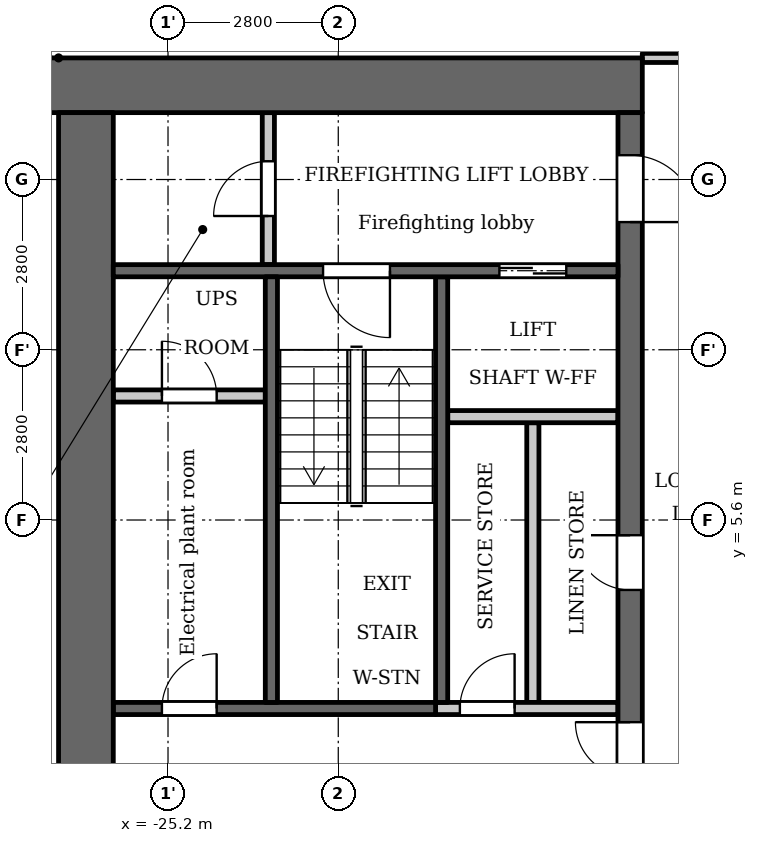
"""IFC4 building model, lengths in metres.
Left out: names, types, materials, properties, quantities, classifications, styles, units other than length and angle.
Written with IfcOpenShell. Run it as: python <this file> out.ifc"""

import sys

from ifc_helpers import new_model, si_unit, direction, frame, frame_2d, origin, place, context, subcontext, project, spatial, rectangle, extrude, element, fill, save


model = new_model("IFC4")
c1 = context("Model", 3, precision=1e-05, world=origin(), true_north=direction((0.0, 1.0)))
c2 = subcontext(c1, "Body", "Model", "MODEL_VIEW")
j1 = project(units=[si_unit("LENGTHUNIT", "METRE"), si_unit("PLANEANGLEUNIT", "RADIAN")], contexts=[c1])
p1 = place(None, origin())
s1 = spatial("IfcSite", under=j1, at=p1, CompositionType="ELEMENT")
p2 = place(p1, origin())
s2 = spatial("IfcBuilding", under=s1, at=p2, CompositionType="ELEMENT")
p3 = place(p2, frame((0.0, 0.0, 69.0)))
s3 = spatial("IfcBuildingStorey", under=s2, at=p3, CompositionType="ELEMENT", Elevation=69.0)
p4 = place(p3, frame((-20.7, 2.6, 0.0), z_axis=(0.0, 0.0, 1.0), x_axis=(0.0, 1.0, 0.0)))
e1 = element("IfcWall", 1, at=p4, inside=s3, PredefinedType="SHEAR", context=c2, shape_type="SweptSolid", body=[
    extrude(rectangle(XDim=7.0, YDim=0.2, at=frame_2d((3.5, 0.0))), origin(), (0.0, 0.0, 1.0), 3.15),
])
p5 = place(p3, frame((-20.8, 2.5, 0.0), z_axis=(0.0, 0.0, 1.0), x_axis=(-1.0, 0.0, 0.0)))
e2 = element("IfcWall", 2, at=p5, inside=s3, PredefinedType="SHEAR", context=c2, shape_type="SweptSolid", body=[
    extrude(rectangle(XDim=5.3, YDim=0.2, at=frame_2d((2.65, 0.0))), origin(), (0.0, 0.0, 1.0), 3.15),
])
p6 = place(p5, frame((3.6, 0.0, 0.0)))
e3 = element("IfcOpeningElement", 3, at=p6, cuts=e2, PredefinedType="OPENING", context=c2, shape_type="SweptSolid", body=[
    extrude(rectangle(XDim=0.9, YDim=2.1, at=frame_2d((0.45, 1.05))), frame((0.0, 0.11, 0.0), z_axis=(0.0, -1.0, 0.0), x_axis=(1.0, 0.0, 0.0)), (0.0, 0.0, 1.0), 0.22),
])
p7 = place(p3, frame((-17.4, 12.75, 0.0), z_axis=(0.0, 0.0, 1.0), x_axis=(-1.0, 0.0, 0.0)))
e4 = element("IfcWall", 4, at=p7, inside=s3, PredefinedType="SHEAR", context=c2, shape_type="SweptSolid", body=[
    extrude(rectangle(XDim=10.4, YDim=0.9, at=frame_2d((5.2, 0.0))), origin(), (0.0, 0.0, 1.0), 3.15),
])
p8 = place(p3, frame((-19.2, 2.6, 0.0), z_axis=(0.0, 0.0, 1.0), x_axis=(0.0, 1.0, 0.0)))
e5 = element("IfcWall", 5, at=p8, inside=s3, PredefinedType="PARTITIONING", context=c2, shape_type="SweptSolid", body=[
    extrude(rectangle(XDim=4.6, YDim=0.2, at=frame_2d((2.3, 0.0))), origin(), (0.0, 0.0, 1.0), 3.15),
])
p9 = place(p3, frame((-17.6, -12.3, 0.0), z_axis=(0.0, 0.0, 1.0), x_axis=(0.0, 1.0, 0.0)))
e6 = element("IfcWall", 6, at=p9, inside=s3, PredefinedType="SHEAR", context=c2, shape_type="SweptSolid", body=[
    extrude(rectangle(XDim=24.6, YDim=0.4, at=frame_2d((12.3, 0.0))), origin(), (0.0, 0.0, 1.0), 3.15),
])
p10 = place(p9, frame((6.0, 0.0, 0.0)))
e7 = element("IfcOpeningElement", 7, at=p10, cuts=e6, PredefinedType="OPENING", context=c2, shape_type="SweptSolid", body=[
    extrude(rectangle(XDim=1.1, YDim=2.1, at=frame_2d((0.55, 1.05))), frame((0.0, 0.21, 0.0), z_axis=(0.0, -1.0, 0.0), x_axis=(1.0, 0.0, 0.0)), (0.0, 0.0, 1.0), 0.42),
])
p11 = place(p9, frame((8.4, 0.0, 0.0)))
e8 = element("IfcOpeningElement", 8, at=p11, cuts=e6, PredefinedType="OPENING", context=c2, shape_type="SweptSolid", body=[
    extrude(rectangle(XDim=1.1, YDim=2.1, at=frame_2d((0.55, 1.05))), frame((0.0, 0.21, 0.0), z_axis=(0.0, -1.0, 0.0), x_axis=(1.0, 0.0, 0.0)), (0.0, 0.0, 1.0), 0.42),
])
p12 = place(p9, frame((10.8, 0.0, 0.0)))
e9 = element("IfcOpeningElement", 9, at=p12, cuts=e6, PredefinedType="OPENING", context=c2, shape_type="SweptSolid", body=[
    extrude(rectangle(XDim=1.1, YDim=2.1, at=frame_2d((0.55, 1.05))), frame((0.0, 0.21, 0.0), z_axis=(0.0, -1.0, 0.0), x_axis=(1.0, 0.0, 0.0)), (0.0, 0.0, 1.0), 0.42),
])
p13 = place(p9, frame((16.75, 0.0, 0.0)))
e10 = element("IfcOpeningElement", 10, at=p13, cuts=e6, PredefinedType="OPENING", context=c2, shape_type="SweptSolid", body=[
    extrude(rectangle(XDim=0.9, YDim=2.1, at=frame_2d((0.45, 1.05))), frame((0.0, 0.21, 0.0), z_axis=(0.0, -1.0, 0.0), x_axis=(1.0, 0.0, 0.0)), (0.0, 0.0, 1.0), 0.42),
])
p14 = place(p9, frame((22.8, 0.0, 0.0)))
e11 = element("IfcOpeningElement", 11, at=p14, cuts=e6, PredefinedType="OPENING", context=c2, shape_type="SweptSolid", body=[
    extrude(rectangle(XDim=1.1, YDim=2.1, at=frame_2d((0.55, 1.05))), frame((0.0, 0.21, 0.0), z_axis=(0.0, -1.0, 0.0), x_axis=(1.0, 0.0, 0.0)), (0.0, 0.0, 1.0), 0.42),
])
p15 = place(p9, frame((0.7, 0.0, 0.0)))
e12 = element("IfcOpeningElement", 12, at=p15, cuts=e6, PredefinedType="OPENING", context=c2, shape_type="SweptSolid", body=[
    extrude(rectangle(XDim=1.1, YDim=2.1, at=frame_2d((0.55, 1.05))), frame((0.0, 0.21, 0.0), z_axis=(0.0, -1.0, 0.0), x_axis=(1.0, 0.0, 0.0)), (0.0, 0.0, 1.0), 0.42),
])
p16 = place(p9, frame((12.775, 0.0, 0.0)))
e13 = element("IfcOpeningElement", 13, at=p16, cuts=e6, PredefinedType="OPENING", context=c2, shape_type="SweptSolid", body=[
    extrude(rectangle(XDim=1.8, YDim=2.1, at=frame_2d((0.9, 1.05))), frame((0.0, 0.21, 0.0), z_axis=(0.0, -1.0, 0.0), x_axis=(1.0, 0.0, 0.0)), (0.0, 0.0, 1.0), 0.42),
])
p17 = place(p3, frame((-26.55, -12.3, 0.0), z_axis=(0.0, 0.0, 1.0), x_axis=(0.0, 1.0, 0.0)))
e14 = element("IfcWall", 14, at=p17, inside=s3, PredefinedType="SHEAR", context=c2, shape_type="SweptSolid", body=[
    extrude(rectangle(XDim=24.6, YDim=0.9, at=frame_2d((12.3, 0.0))), origin(), (0.0, 0.0, 1.0), 3.15),
])
p18 = place(p3, frame((-23.55, 9.8, 0.0), z_axis=(0.0, 0.0, 1.0), x_axis=(0.0, 1.0, 0.0)))
e15 = element("IfcWall", 15, at=p18, inside=s3, PredefinedType="PARTITIONING", context=c2, shape_type="SweptSolid", body=[
    extrude(rectangle(XDim=2.5, YDim=0.2, at=frame_2d((1.25, 0.0))), origin(), (0.0, 0.0, 1.0), 3.15),
])
p19 = place(p18, frame((0.8, 0.0, 0.0)))
e16 = element("IfcOpeningElement", 16, at=p19, cuts=e15, PredefinedType="OPENING", context=c2, shape_type="SweptSolid", body=[
    extrude(rectangle(XDim=0.9, YDim=2.1, at=frame_2d((0.45, 1.05))), frame((0.0, 0.11, 0.0), z_axis=(0.0, -1.0, 0.0), x_axis=(1.0, 0.0, 0.0)), (0.0, 0.0, 1.0), 0.22),
])
p20 = place(p3, frame((-23.6, 7.64, 0.0), z_axis=(0.0, 0.0, 1.0), x_axis=(-1.0, 0.0, 0.0)))
e17 = element("IfcWall", 17, at=p20, inside=s3, PredefinedType="PARTITIONING", context=c2, shape_type="SweptSolid", body=[
    extrude(rectangle(XDim=2.5, YDim=0.2, at=frame_2d((1.25, 0.0))), origin(), (0.0, 0.0, 1.0), 3.15),
])
p21 = place(p20, frame((0.8, 0.0, 0.0)))
e18 = element("IfcOpeningElement", 18, at=p21, cuts=e17, PredefinedType="OPENING", context=c2, shape_type="SweptSolid", body=[
    extrude(rectangle(XDim=0.9, YDim=2.1, at=frame_2d((0.45, 1.05))), frame((0.0, 0.11, 0.0), z_axis=(0.0, -1.0, 0.0), x_axis=(1.0, 0.0, 0.0)), (0.0, 0.0, 1.0), 0.22),
])
p22 = place(p3, frame((-17.8, 2.5, 0.0), z_axis=(0.0, 0.0, 1.0), x_axis=(-1.0, 0.0, 0.0)))
e19 = element("IfcWall", 19, at=p22, inside=s3, PredefinedType="PARTITIONING", context=c2, shape_type="SweptSolid", body=[
    extrude(rectangle(XDim=3.0, YDim=0.2, at=frame_2d((1.5, 0.0))), origin(), (0.0, 0.0, 1.0), 3.15),
])
p23 = place(p22, frame((1.7, 0.0, 0.0)))
e20 = element("IfcOpeningElement", 20, at=p23, cuts=e19, PredefinedType="OPENING", context=c2, shape_type="SweptSolid", body=[
    extrude(rectangle(XDim=0.9, YDim=2.1, at=frame_2d((0.45, 1.05))), frame((0.0, 0.11, 0.0), z_axis=(0.0, -1.0, 0.0), x_axis=(1.0, 0.0, 0.0)), (0.0, 0.0, 1.0), 0.22),
])
p24 = place(p3, frame((-17.8, 7.3, 0.0), z_axis=(0.0, 0.0, 1.0), x_axis=(-1.0, 0.0, 0.0)))
e21 = element("IfcWall", 21, at=p24, inside=s3, PredefinedType="PARTITIONING", context=c2, shape_type="SweptSolid", body=[
    extrude(rectangle(XDim=2.8, YDim=0.2, at=frame_2d((1.4, 0.0))), origin(), (0.0, 0.0, 1.0), 3.15),
])
p25 = place(p3, frame((-17.8, 9.7, 0.0), z_axis=(0.0, 0.0, 1.0), x_axis=(-1.0, 0.0, 0.0)))
e22 = element("IfcWall", 22, at=p25, inside=s3, PredefinedType="SHEAR", context=c2, shape_type="SweptSolid", body=[
    extrude(rectangle(XDim=8.3, YDim=0.2, at=frame_2d((4.15, 0.0))), origin(), (0.0, 0.0, 1.0), 3.15),
])
p26 = place(p25, frame((0.85, 0.0, 0.0)))
e23 = element("IfcOpeningElement", 23, at=p26, cuts=e22, PredefinedType="OPENING", context=c2, shape_type="SweptSolid", body=[
    extrude(rectangle(XDim=1.1, YDim=2.1, at=frame_2d((0.55, 1.05))), frame((0.0, 0.11, 0.0), z_axis=(0.0, -1.0, 0.0), x_axis=(1.0, 0.0, 0.0)), (0.0, 0.0, 1.0), 0.22),
])
p27 = place(p25, frame((3.75, 0.0, 0.0)))
e24 = element("IfcOpeningElement", 24, at=p27, cuts=e22, PredefinedType="OPENING", context=c2, shape_type="SweptSolid", body=[
    extrude(rectangle(XDim=1.1, YDim=2.1, at=frame_2d((0.55, 1.05))), frame((0.0, 0.11, 0.0), z_axis=(0.0, -1.0, 0.0), x_axis=(1.0, 0.0, 0.0)), (0.0, 0.0, 1.0), 0.22),
])
p28 = place(p3, frame((-23.5, 2.6, 0.0), z_axis=(0.0, 0.0, 1.0), x_axis=(0.0, 1.0, 0.0)))
e25 = element("IfcWall", 25, at=p28, inside=s3, PredefinedType="SHEAR", context=c2, shape_type="SweptSolid", body=[
    extrude(rectangle(XDim=7.0, YDim=0.2, at=frame_2d((3.5, 0.0))), origin(), (0.0, 0.0, 1.0), 3.15),
])
p29 = place(p3, frame((-17.4, 13.2, 0.0), z_axis=(0.0, 0.0, 1.0), x_axis=(1.0, 0.0, 0.0)))
e26 = element("IfcWall", 26, at=p29, inside=s3, PredefinedType="PARTITIONING", context=c2, shape_type="SweptSolid", body=[
    extrude(rectangle(XDim=34.8, YDim=0.15, at=frame_2d((17.4, 0.0))), origin(), (0.0, 0.0, 1.0), 3.15),
])
p30 = place(p29, frame((0.75, 0.0, 0.0)))
e27 = element("IfcOpeningElement", 27, at=p30, cuts=e26, PredefinedType="OPENING", context=c2, shape_type="SweptSolid", body=[
    extrude(rectangle(XDim=1.0, YDim=2.1, at=frame_2d((0.5, 1.05))), frame((0.0, 0.085, 0.0), z_axis=(0.0, -1.0, 0.0), x_axis=(1.0, 0.0, 0.0)), (0.0, 0.0, 1.0), 0.17),
])
p31 = place(p29, frame((33.15, 0.0, 0.0)))
e28 = element("IfcOpeningElement", 28, at=p31, cuts=e26, PredefinedType="OPENING", context=c2, shape_type="SweptSolid", body=[
    extrude(rectangle(XDim=1.0, YDim=2.1, at=frame_2d((0.5, 1.05))), frame((0.0, 0.085, 0.0), z_axis=(0.0, -1.0, 0.0), x_axis=(1.0, 0.0, 0.0)), (0.0, 0.0, 1.0), 0.17),
])
p32 = place(p29, frame((6.85, 0.0, 0.0)))
e29 = element("IfcOpeningElement", 29, at=p32, cuts=e26, PredefinedType="OPENING", context=c2, shape_type="SweptSolid", body=[
    extrude(rectangle(XDim=1.0, YDim=2.1, at=frame_2d((0.5, 1.05))), frame((0.0, 0.085, 0.0), z_axis=(0.0, -1.0, 0.0), x_axis=(1.0, 0.0, 0.0)), (0.0, 0.0, 1.0), 0.17),
])
p33 = place(p29, frame((12.45, 0.0, 0.0)))
e30 = element("IfcOpeningElement", 30, at=p33, cuts=e26, PredefinedType="OPENING", context=c2, shape_type="SweptSolid", body=[
    extrude(rectangle(XDim=1.0, YDim=2.1, at=frame_2d((0.5, 1.05))), frame((0.0, 0.085, 0.0), z_axis=(0.0, -1.0, 0.0), x_axis=(1.0, 0.0, 0.0)), (0.0, 0.0, 1.0), 0.17),
])
p34 = place(p29, frame((23.65, 0.0, 0.0)))
e31 = element("IfcOpeningElement", 31, at=p34, cuts=e26, PredefinedType="OPENING", context=c2, shape_type="SweptSolid", body=[
    extrude(rectangle(XDim=1.0, YDim=2.1, at=frame_2d((0.5, 1.05))), frame((0.0, 0.085, 0.0), z_axis=(0.0, -1.0, 0.0), x_axis=(1.0, 0.0, 0.0)), (0.0, 0.0, 1.0), 0.17),
])
p35 = place(p13, origin())
e32 = element("IfcDoor", 32, at=p35, inside=s3, OperationType="SINGLE_SWING_LEFT", PredefinedType="DOOR", context=c2, shape_type="SweptSolid", body=[
    extrude(rectangle(XDim=0.9, YDim=2.1, at=frame_2d((0.45, 1.05))), frame((0.0, 0.025, 0.0), z_axis=(0.0, -1.0, 0.0), x_axis=(1.0, 0.0, 0.0)), (0.0, 0.0, 1.0), 0.05),
])
fill(e10, e32)
p36 = place(p23, origin())
e33 = element("IfcDoor", 33, at=p36, inside=s3, OperationType="SINGLE_SWING_LEFT", PredefinedType="DOOR", context=c2, shape_type="SweptSolid", body=[
    extrude(rectangle(XDim=0.9, YDim=2.1, at=frame_2d((0.45, 1.05))), frame((0.0, 0.025, 0.0), z_axis=(0.0, -1.0, 0.0), x_axis=(1.0, 0.0, 0.0)), (0.0, 0.0, 1.0), 0.05),
])
fill(e20, e33)
p37 = place(p26, origin())
e34 = element("IfcDoor", 34, at=p37, inside=s3, OperationType="DOUBLE_DOOR_SLIDING", PredefinedType="DOOR", context=c2, shape_type="SweptSolid", body=[
    extrude(rectangle(XDim=1.1, YDim=2.1, at=frame_2d((0.55, 1.05))), frame((0.0, 0.025, 0.0), z_axis=(0.0, -1.0, 0.0), x_axis=(1.0, 0.0, 0.0)), (0.0, 0.0, 1.0), 0.05),
])
fill(e23, e34)
p38 = place(p14, origin())
e35 = element("IfcDoor", 35, at=p38, inside=s3, OperationType="SINGLE_SWING_LEFT", PredefinedType="DOOR", context=c2, shape_type="SweptSolid", body=[
    extrude(rectangle(XDim=1.1, YDim=2.1, at=frame_2d((0.55, 1.05))), frame((0.0, 0.025, 0.0), z_axis=(0.0, -1.0, 0.0), x_axis=(1.0, 0.0, 0.0)), (0.0, 0.0, 1.0), 0.05),
])
fill(e11, e35)
p39 = place(p19, origin())
e36 = element("IfcDoor", 36, at=p39, inside=s3, OperationType="SINGLE_SWING_RIGHT", PredefinedType="DOOR", context=c2, shape_type="SweptSolid", body=[
    extrude(rectangle(XDim=0.9, YDim=2.1, at=frame_2d((0.45, 1.05))), frame((0.0, 0.025, 0.0), z_axis=(0.0, -1.0, 0.0), x_axis=(1.0, 0.0, 0.0)), (0.0, 0.0, 1.0), 0.05),
])
fill(e16, e36)
p40 = place(p27, origin())
e37 = element("IfcDoor", 37, at=p40, inside=s3, OperationType="SINGLE_SWING_RIGHT", PredefinedType="DOOR", context=c2, shape_type="SweptSolid", body=[
    extrude(rectangle(XDim=1.1, YDim=2.1, at=frame_2d((0.55, 1.05))), frame((0.0, 0.025, 0.0), z_axis=(0.0, -1.0, 0.0), x_axis=(1.0, 0.0, 0.0)), (0.0, 0.0, 1.0), 0.05),
])
fill(e24, e37)
p41 = place(p16, origin())
e38 = element("IfcDoor", 38, at=p41, inside=s3, OperationType="DOUBLE_DOOR_SINGLE_SWING", PredefinedType="DOOR", context=c2, shape_type="SweptSolid", body=[
    extrude(rectangle(XDim=1.8, YDim=2.1, at=frame_2d((0.9, 1.05))), frame((0.0, 0.025, 0.0), z_axis=(0.0, -1.0, 0.0), x_axis=(1.0, 0.0, 0.0)), (0.0, 0.0, 1.0), 0.05),
])
fill(e13, e38)
p42 = place(p21, origin())
e39 = element("IfcDoor", 39, at=p42, inside=s3, OperationType="SINGLE_SWING_RIGHT", PredefinedType="DOOR", context=c2, shape_type="SweptSolid", body=[
    extrude(rectangle(XDim=0.9, YDim=2.1, at=frame_2d((0.45, 1.05))), frame((0.0, 0.025, 0.0), z_axis=(0.0, -1.0, 0.0), x_axis=(1.0, 0.0, 0.0)), (0.0, 0.0, 1.0), 0.05),
])
fill(e18, e39)
p43 = place(p6, origin())
e40 = element("IfcDoor", 40, at=p43, inside=s3, OperationType="SINGLE_SWING_LEFT", PredefinedType="DOOR", context=c2, shape_type="SweptSolid", body=[
    extrude(rectangle(XDim=0.9, YDim=2.1, at=frame_2d((0.45, 1.05))), frame((0.0, 0.025, 0.0), z_axis=(0.0, -1.0, 0.0), x_axis=(1.0, 0.0, 0.0)), (0.0, 0.0, 1.0), 0.05),
])
fill(e3, e40)
save(model, sys.argv[1])
